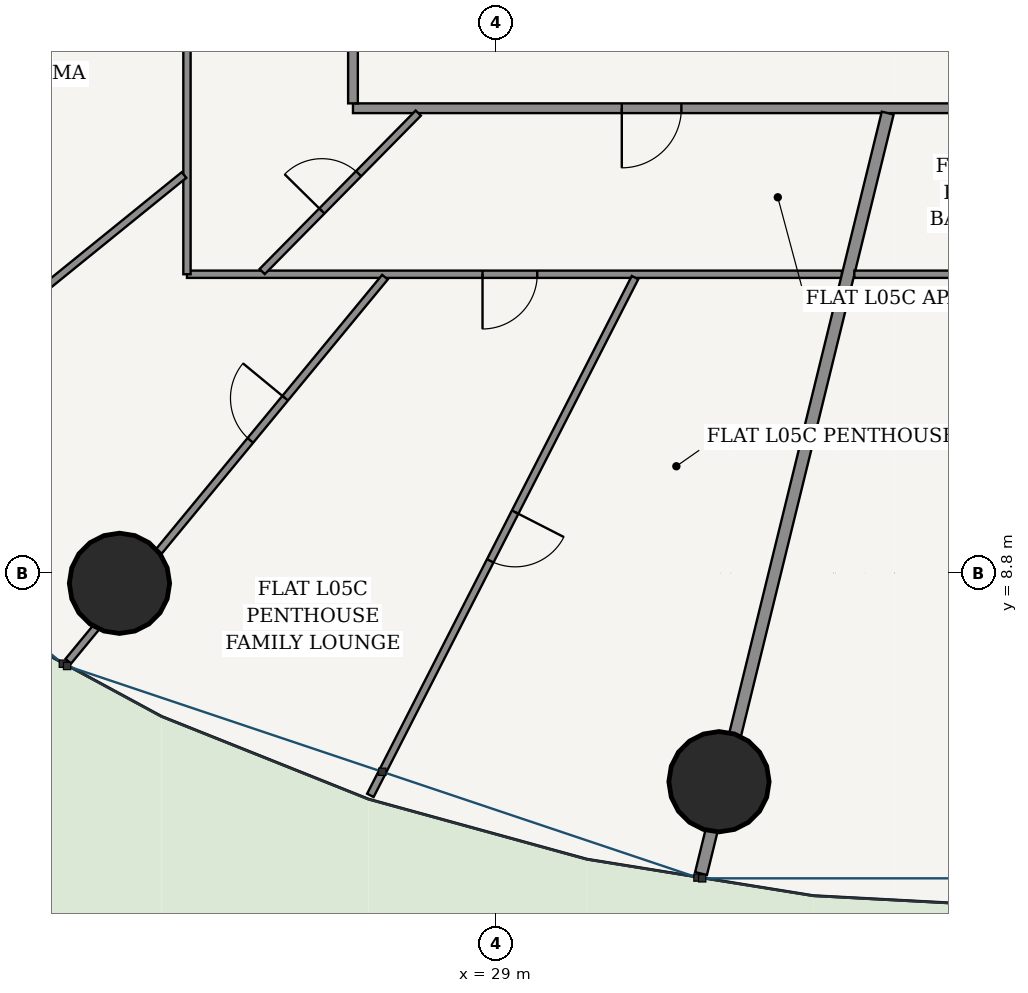
"""IFC4 building model, lengths in metres.
Left out: names, types, materials, properties, quantities, classifications, styles, units other than length and angle.
Written with IfcOpenShell. Run it as: python <this file> out.ifc"""

import sys

from ifc_helpers import new_model, si_unit, direction, frame, frame_2d, origin, origin_2d, place, context, subcontext, project, spatial, rectangle, hollow_circle, extrude, source, transform, mapped, element, fill, save


model = new_model("IFC4")
c1 = context("Model", 3, precision=1e-05, world=origin(), true_north=direction((-0.2419218956, 0.970295726276)))
c2 = subcontext(c1, "Body", "Model", "MODEL_VIEW")
j1 = project(units=[si_unit("LENGTHUNIT", "METRE"), si_unit("PLANEANGLEUNIT", "RADIAN")], contexts=[c1])
p1 = place(None, origin())
s1 = spatial("IfcSite", under=j1, at=p1, CompositionType="ELEMENT")
p2 = place(p1, origin())
s2 = spatial("IfcBuilding", under=s1, at=p2, CompositionType="ELEMENT")
p3 = place(p2, frame((0.0, 0.0, 24.0)))
s3 = spatial("IfcBuildingStorey", under=s2, at=p3, CompositionType="ELEMENT", Elevation=24.0)
for number, where, z_axis, x_axis in (
    (1, (22.805, 8.632, 0.0), (0.0, 0.0, 1.0), (1.0, 0.0, 0.0)),
    (2, (32.664, 5.37, 0.0), (0.0, 0.0, 1.0), (1.0, 0.0, 0.0)),
):
    element("IfcColumn", number, at=place(p3, frame(where, z_axis=z_axis, x_axis=x_axis)), inside=s3, PredefinedType="COLUMN", context=c2, shape_type="SweptSolid", body=[
        extrude(hollow_circle(Radius=0.825, WallThickness=0.05, at=origin_2d()), origin(), (0.0, 0.0, 1.0), 3.6),
    ])
p4 = place(p3, frame((26.645, 16.445, 0.0), z_axis=(0.0, 0.0, 1.0), x_axis=(1.0, 0.0, 0.0)))
e3 = element("IfcWall", 3, at=p4, inside=s3, PredefinedType="PARTITIONING", context=c2, shape_type="SweptSolid", body=[
    extrude(rectangle(XDim=22.71, YDim=0.16, at=frame_2d((11.355, 0.0))), origin(), (0.0, 0.0, 1.0), 2.688),
])
p5 = place(p4, frame((4.421, 0.0, 0.0)))
e4 = element("IfcOpeningElement", 4, at=p5, cuts=e3, PredefinedType="OPENING", context=c2, shape_type="SweptSolid", body=[
    extrude(rectangle(XDim=0.98, YDim=2.2, at=frame_2d((0.49, 1.1))), frame((0.0, 0.09, 0.0), z_axis=(0.0, -1.0, 0.0), x_axis=(1.0, 0.0, 0.0)), (0.0, 0.0, 1.0), 0.18),
])
p6 = place(p4, frame((16.153, 0.0, 0.0)))
e5 = element("IfcOpeningElement", 5, at=p6, cuts=e3, PredefinedType="OPENING", context=c2, shape_type="SweptSolid", body=[
    extrude(rectangle(XDim=0.98, YDim=2.2, at=frame_2d((0.49, 1.1))), frame((0.0, 0.09, 0.0), z_axis=(0.0, -1.0, 0.0), x_axis=(1.0, 0.0, 0.0)), (0.0, 0.0, 1.0), 0.18),
])
p7 = place(p3, frame((26.645, 16.525, 0.0), z_axis=(0.0, 0.0, 1.0), x_axis=(0.0, 1.0, 0.0)))
e6 = element("IfcWall", 6, at=p7, inside=s3, PredefinedType="PARTITIONING", context=c2, shape_type="SweptSolid", body=[
    extrude(rectangle(XDim=20.55, YDim=0.16, at=frame_2d((10.275, 0.0))), origin(), (0.0, 0.0, 1.0), 2.688),
])
p8 = place(p3, frame((34.686, 13.715, 0.0), z_axis=(0.0, 0.0, 1.0), x_axis=(-1.0, 0.0, 0.0)))
e7 = element("IfcWall", 7, at=p8, inside=s3, PredefinedType="PARTITIONING", context=c2, shape_type="SweptSolid", body=[
    extrude(rectangle(XDim=10.771, YDim=0.12, at=frame_2d((5.385, 0.0))), origin(), (0.0, 0.0, 1.0), 2.688),
])
p9 = place(p8, frame((5.01, 0.0, 0.0)))
e8 = element("IfcOpeningElement", 8, at=p9, cuts=e7, PredefinedType="OPENING", context=c2, shape_type="SweptSolid", body=[
    extrude(rectangle(XDim=0.9, YDim=2.15, at=frame_2d((0.45, 1.075))), frame((0.0, 0.07, 0.0), z_axis=(0.0, -1.0, 0.0), x_axis=(1.0, 0.0, 0.0)), (0.0, 0.0, 1.0), 0.14),
])
p10 = place(p3, frame((23.915, 13.715, 0.0), z_axis=(0.0, 0.0, 1.0), x_axis=(0.0, 1.0, 0.0)))
e9 = element("IfcWall", 9, at=p10, inside=s3, PredefinedType="PARTITIONING", context=c2, shape_type="SweptSolid", body=[
    extrude(rectangle(XDim=15.253, YDim=0.12, at=frame_2d((7.626, 0.0))), origin(), (0.0, 0.0, 1.0), 2.688),
])
p11 = place(p10, frame((9.429, 0.0, 0.0)))
e10 = element("IfcOpeningElement", 10, at=p11, cuts=e9, PredefinedType="OPENING", context=c2, shape_type="SweptSolid", body=[
    extrude(rectangle(XDim=0.9, YDim=2.15, at=frame_2d((0.45, 1.075))), frame((0.0, 0.07, 0.0), z_axis=(0.0, -1.0, 0.0), x_axis=(1.0, 0.0, 0.0)), (0.0, 0.0, 1.0), 0.14),
])
p12 = place(p10, frame((12.803, 0.0, 0.0)))
e11 = element("IfcOpeningElement", 11, at=p12, cuts=e9, PredefinedType="OPENING", context=c2, shape_type="SweptSolid", body=[
    extrude(rectangle(XDim=0.9, YDim=2.15, at=frame_2d((0.45, 1.075))), frame((0.0, 0.07, 0.0), z_axis=(0.0, -1.0, 0.0), x_axis=(1.0, 0.0, 0.0)), (0.0, 0.0, 1.0), 0.14),
])
p13 = place(p3, frame((23.867, 15.347, 0.0), z_axis=(0.0, 0.0, 1.0), x_axis=(-0.776936623447, -0.629578814087, 0.0)))
e12 = element("IfcWall", 12, at=p13, inside=s3, PredefinedType="PARTITIONING", context=c2, shape_type="SweptSolid", body=[
    extrude(rectangle(XDim=8.136, YDim=0.12, at=frame_2d((4.068, 0.0))), origin(), (0.0, 0.0, 1.0), 2.762),
])
p14 = place(p13, frame((3.618, 0.0, 0.0)))
e13 = element("IfcOpeningElement", 13, at=p14, cuts=e12, PredefinedType="OPENING", context=c2, shape_type="SweptSolid", body=[
    extrude(rectangle(XDim=0.9, YDim=2.15, at=frame_2d((0.45, 1.075))), frame((0.0, 0.07, 0.0), z_axis=(0.0, -1.0, 0.0), x_axis=(1.0, 0.0, 0.0)), (0.0, 0.0, 1.0), 0.14),
])
p15 = place(p3, frame((27.171, 13.667, 0.0), z_axis=(0.0, 0.0, 1.0), x_axis=(-0.636177533893, -0.771542704826, 0.0)))
e14 = element("IfcWall", 14, at=p15, inside=s3, PredefinedType="PARTITIONING", context=c2, shape_type="SweptSolid", body=[
    extrude(rectangle(XDim=8.187, YDim=0.12, at=frame_2d((4.093, 0.0))), origin(), (0.0, 0.0, 1.0), 2.688),
])
p16 = place(p15, frame((2.579, 0.0, 0.0)))
e15 = element("IfcOpeningElement", 15, at=p16, cuts=e14, PredefinedType="OPENING", context=c2, shape_type="SweptSolid", body=[
    extrude(rectangle(XDim=0.9, YDim=2.15, at=frame_2d((0.45, 1.075))), frame((0.0, 0.07, 0.0), z_axis=(0.0, -1.0, 0.0), x_axis=(1.0, 0.0, 0.0)), (0.0, 0.0, 1.0), 0.14),
])
p17 = place(p3, frame((31.283, 13.66, 0.0), z_axis=(0.0, 0.0, 1.0), x_axis=(-0.455131303234, -0.890424335256, 0.0)))
e16 = element("IfcWall", 16, at=p17, inside=s3, PredefinedType="PARTITIONING", context=c2, shape_type="SweptSolid", body=[
    extrude(rectangle(XDim=9.562, YDim=0.12, at=frame_2d((4.781, 0.0))), origin(), (0.0, 0.0, 1.0), 2.762),
])
p18 = place(p17, frame((4.331, 0.0, 0.0)))
e17 = element("IfcOpeningElement", 17, at=p18, cuts=e16, PredefinedType="OPENING", context=c2, shape_type="SweptSolid", body=[
    extrude(rectangle(XDim=0.9, YDim=2.15, at=frame_2d((0.45, 1.075))), frame((0.0, 0.07, 0.0), z_axis=(0.0, -1.0, 0.0), x_axis=(1.0, 0.0, 0.0)), (0.0, 0.0, 1.0), 0.14),
])
p19 = place(p3, frame((27.719, 16.365, 0.0), z_axis=(0.0, 0.0, 1.0), x_axis=(-0.701848204267, -0.712326539002, 0.0)))
e18 = element("IfcWall", 18, at=p19, inside=s3, PredefinedType="PARTITIONING", context=c2, shape_type="SweptSolid", body=[
    extrude(rectangle(XDim=3.658, YDim=0.12, at=frame_2d((1.829, 0.0))), origin(), (0.0, 0.0, 1.0), 2.688),
])
p20 = place(p19, frame((1.399, 0.0, 0.0)))
e19 = element("IfcOpeningElement", 19, at=p20, cuts=e18, PredefinedType="OPENING", context=c2, shape_type="SweptSolid", body=[
    extrude(rectangle(XDim=0.86, YDim=2.15, at=frame_2d((0.43, 1.075))), frame((0.0, 0.07, 0.0), z_axis=(0.0, -1.0, 0.0), x_axis=(1.0, 0.0, 0.0)), (0.0, 0.0, 1.0), 0.14),
])
p21 = place(p3, frame((35.438, 16.365, 0.0), z_axis=(0.0, 0.0, 1.0), x_axis=(-0.238380116209, -0.971171931326, 0.0)))
e20 = element("IfcWall", 20, at=p21, inside=s3, PredefinedType="PARTITIONING", context=c2, shape_type="SweptSolid", body=[
    extrude(rectangle(XDim=12.877, YDim=0.2, at=frame_2d((6.438, 0.0))), origin(), (0.0, 0.0, 1.0), 2.688),
])
p22 = place(p3, frame((52.085, 13.715, 0.0), z_axis=(0.0, 0.0, 1.0), x_axis=(-1.0, 0.0, 0.0)))
e21 = element("IfcWall", 21, at=p22, inside=s3, PredefinedType="PARTITIONING", context=c2, shape_type="SweptSolid", body=[
    extrude(rectangle(XDim=17.195, YDim=0.12, at=frame_2d((8.597, 0.0))), origin(), (0.0, 0.0, 1.0), 2.688),
])
p23 = place(p22, frame((9.191, 0.0, 0.0)))
e22 = element("IfcOpeningElement", 22, at=p23, cuts=e21, PredefinedType="OPENING", context=c2, shape_type="SweptSolid", body=[
    extrude(rectangle(XDim=0.9, YDim=2.15, at=frame_2d((0.45, 1.075))), frame((0.0, 0.07, 0.0), z_axis=(0.0, -1.0, 0.0), x_axis=(1.0, 0.0, 0.0)), (0.0, 0.0, 1.0), 0.14),
])
m1 = source(origin(), c2, "Body", "SweptSolid", [
    extrude(rectangle(XDim=0.98, YDim=2.2, at=frame_2d((0.49, 1.1))), frame((0.0, 0.025, 0.0), z_axis=(0.0, -1.0, 0.0), x_axis=(1.0, 0.0, 0.0)), (0.0, 0.0, 1.0), 0.05),
])
p24 = place(p5, frame((0.98, 0.0, 0.0), z_axis=(0.0, 0.0, 1.0), x_axis=(-1.0, 0.0, 0.0)))
e23 = element("IfcDoor", 23, at=p24, inside=s3, OperationType="SINGLE_SWING_RIGHT", PredefinedType="DOOR", context=c2, shape_type="MappedRepresentation", body=[
    mapped(m1, transform((0.0, 0.0, 0.0), scale=1.0)),
])
fill(e4, e23)
m2 = source(origin(), c2, "Body", "SweptSolid", [
    extrude(rectangle(XDim=0.86, YDim=2.15, at=frame_2d((0.43, 1.075))), frame((0.0, 0.025, 0.0), z_axis=(0.0, -1.0, 0.0), x_axis=(1.0, 0.0, 0.0)), (0.0, 0.0, 1.0), 0.05),
])
p25 = place(p20, frame((0.86, 0.0, 0.0), z_axis=(0.0, 0.0, 1.0), x_axis=(-1.0, 0.0, 0.0)))
e24 = element("IfcDoor", 24, at=p25, inside=s3, OperationType="SINGLE_SWING_LEFT", PredefinedType="DOOR", context=c2, shape_type="MappedRepresentation", body=[
    mapped(m2, transform((0.0, 0.0, 0.0), scale=1.0)),
])
fill(e19, e24)
m3 = source(origin(), c2, "Body", "SweptSolid", [
    extrude(rectangle(XDim=0.9, YDim=2.15, at=frame_2d((0.45, 1.075))), frame((0.0, 0.025, 0.0), z_axis=(0.0, -1.0, 0.0), x_axis=(1.0, 0.0, 0.0)), (0.0, 0.0, 1.0), 0.05),
])
p26 = place(p9, origin())
e25 = element("IfcDoor", 25, at=p26, inside=s3, OperationType="SINGLE_SWING_RIGHT", PredefinedType="DOOR", context=c2, shape_type="MappedRepresentation", body=[
    mapped(m3, transform((0.0, 0.0, 0.0), scale=1.0)),
])
fill(e8, e25)
p27 = place(p18, origin())
e26 = element("IfcDoor", 26, at=p27, inside=s3, OperationType="SINGLE_SWING_LEFT", PredefinedType="DOOR", context=c2, shape_type="MappedRepresentation", body=[
    mapped(m3, transform((0.0, 0.0, 0.0), scale=1.0)),
])
fill(e17, e26)
p28 = place(p16, frame((0.9, 0.0, 0.0), z_axis=(0.0, 0.0, 1.0), x_axis=(-1.0, 0.0, 0.0)))
e27 = element("IfcDoor", 27, at=p28, inside=s3, OperationType="SINGLE_SWING_RIGHT", PredefinedType="DOOR", context=c2, shape_type="MappedRepresentation", body=[
    mapped(m3, transform((0.0, 0.0, 0.0), scale=1.0)),
])
fill(e15, e27)
save(model, sys.argv[1])
